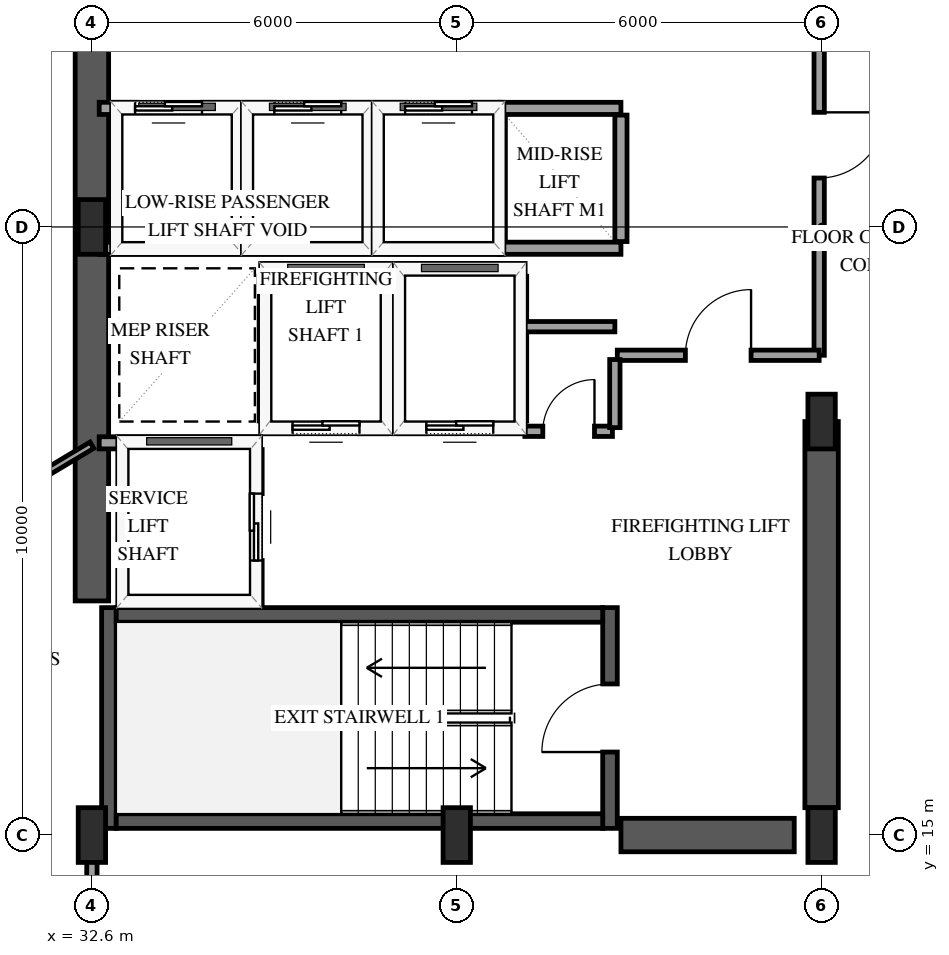
"""IFC4 building model, lengths in metres.
Left out: names, types, materials, properties, quantities, classifications, styles, units other than length and angle.
Written with IfcOpenShell. Run it as: python <this file> out.ifc"""

import sys

from ifc_helpers import new_model, si_unit, direction, frame, frame_2d, origin, origin_2d, place, context, subcontext, project, spatial, rectangle, extrude, element, fill, save


model = new_model("IFC4")
c1 = context("Model", 3, precision=1e-05, world=origin(), true_north=direction((0.0, 1.0)))
c2 = subcontext(c1, "Body", "Model", "MODEL_VIEW")
j1 = project(units=[si_unit("LENGTHUNIT", "METRE"), si_unit("PLANEANGLEUNIT", "RADIAN")], contexts=[c1])
p1 = place(None, origin())
s1 = spatial("IfcSite", under=j1, at=p1, CompositionType="ELEMENT")
p2 = place(p1, origin())
s2 = spatial("IfcBuilding", under=s1, at=p2, CompositionType="ELEMENT")
p3 = place(p2, frame((0.0, 0.0, 99.1)))
s3 = spatial("IfcBuildingStorey", under=s2, at=p3, CompositionType="ELEMENT", Elevation=99.1)
p4 = place(p3, frame((32.88, 15.11, 0.0), z_axis=(0.0, 0.0, 1.0), x_axis=(0.0, 1.0, 0.0)))
e1 = element("IfcWall", 1, at=p4, inside=s3, PredefinedType="SHEAR", context=c2, shape_type="SweptSolid", body=[
    extrude(rectangle(XDim=3.63, YDim=0.24, at=frame_2d((1.815, 0.0))), origin(), (0.0, 0.0, 1.0), 3.9),
])
p5 = place(p3, frame((41.12, 15.11, 0.0), z_axis=(0.0, 0.0, 1.0), x_axis=(0.0, 1.0, 0.0)))
e2 = element("IfcWall", 2, at=p5, inside=s3, PredefinedType="SHEAR", context=c2, shape_type="SweptSolid", body=[
    extrude(rectangle(XDim=3.63, YDim=0.24, at=frame_2d((1.815, 0.0))), origin(), (0.0, 0.0, 1.0), 3.9),
])
p6 = place(p5, frame((1.255, 0.0, 0.0)))
e3 = element("IfcOpeningElement", 3, at=p6, cuts=e2, PredefinedType="OPENING", context=c2, shape_type="SweptSolid", body=[
    extrude(rectangle(XDim=1.12, YDim=2.15, at=frame_2d((0.56, 1.075))), frame((0.0, 0.13, 0.0), z_axis=(0.0, -1.0, 0.0), x_axis=(1.0, 0.0, 0.0)), (0.0, 0.0, 1.0), 0.26),
])
for number, where, z_axis, x_axis in (
    (4, (33.0, 15.23, 0.0), (0.0, 0.0, 1.0), (1.0, 0.0, 0.0)),
    (5, (33.0, 18.62, 0.0), (0.0, 0.0, 1.0), (1.0, 0.0, 0.0)),
):
    element("IfcWall", number, at=place(p3, frame(where, z_axis=z_axis, x_axis=x_axis)), inside=s3, PredefinedType="SHEAR", context=c2, shape_type="SweptSolid", body=[
        extrude(rectangle(XDim=8.0, YDim=0.24, at=frame_2d((4.0, 0.0))), origin(), (0.0, 0.0, 1.0), 3.9),
    ])
p7 = place(p3, frame((32.6, 18.85, 0.0), z_axis=(0.0, 0.0, 1.0), x_axis=(0.0, 1.0, 0.0)))
e6 = element("IfcWall", 6, at=p7, inside=s3, PredefinedType="SHEAR", context=c2, shape_type="SweptSolid", body=[
    extrude(rectangle(XDim=12.3, YDim=0.55, at=frame_2d((6.15, 0.0))), origin(), (0.0, 0.0, 1.0), 3.9),
])
p8 = place(p3, frame((41.3, 15.0, 0.0), z_axis=(0.0, 0.0, 1.0), x_axis=(1.0, 0.0, 0.0)))
e7 = element("IfcWall", 7, at=p8, inside=s3, PredefinedType="SHEAR", context=c2, shape_type="SweptSolid", body=[
    extrude(rectangle(XDim=2.85, YDim=0.55, at=frame_2d((1.425, 0.0))), origin(), (0.0, 0.0, 1.0), 3.9),
])
p9 = place(p3, frame((44.6, 15.45, 0.0), z_axis=(0.0, 0.0, 1.0), x_axis=(0.0, 1.0, 0.0)))
e8 = element("IfcWall", 8, at=p9, inside=s3, PredefinedType="SHEAR", context=c2, shape_type="SweptSolid", body=[
    extrude(rectangle(XDim=6.35, YDim=0.55, at=frame_2d((3.175, 0.0))), origin(), (0.0, 0.0, 1.0), 3.9),
])
for number, where, z_axis, x_axis in (
    (9, (32.6, 15.0, 0.0), (0.0, 0.0, 1.0), (1.0, 0.0, 0.0)),
    (10, (32.6, 25.0, 0.0), (0.0, 0.0, 1.0), (1.0, 0.0, 0.0)),
    (11, (38.6, 15.0, 0.0), (0.0, 0.0, 1.0), (1.0, 0.0, 0.0)),
    (12, (44.6, 15.0, 0.0), (0.0, 0.0, 1.0), (1.0, 0.0, 0.0)),
    (13, (44.6, 21.8, 0.0), (0.0, 0.0, 1.0), (1.0, 0.0, 0.0)),
):
    element("IfcColumn", number, at=place(p3, frame(where, z_axis=z_axis, x_axis=x_axis)), inside=s3, PredefinedType="PILASTER", context=c2, shape_type="SweptSolid", body=[
        extrude(rectangle(XDim=0.45, YDim=0.9, at=origin_2d()), origin(), (0.0, 0.0, 1.0), 3.9),
    ])
p10 = place(p3, frame((35.45, 21.7, 0.0), z_axis=(0.0, 0.0, 1.0), x_axis=(1.0, 0.0, 0.0)))
e14 = element("IfcWall", 14, at=p10, inside=s3, PredefinedType="SOLIDWALL", context=c2, shape_type="SweptSolid", body=[
    extrude(rectangle(XDim=2.0, YDim=0.2, at=frame_2d((1.0, 0.0))), origin(), (0.0, 0.0, 1.0), 3.6),
])
p11 = place(p10, frame((0.45, 0.0, 0.0)))
e15 = element("IfcOpeningElement", 15, at=p11, cuts=e14, PredefinedType="OPENING", context=c2, shape_type="SweptSolid", body=[
    extrude(rectangle(XDim=1.1, YDim=2.15, at=frame_2d((0.55, 1.075))), frame((0.0, 0.11, 0.0), z_axis=(0.0, -1.0, 0.0), x_axis=(1.0, 0.0, 0.0)), (0.0, 0.0, 1.0), 0.22),
])
p12 = place(p3, frame((35.45, 24.3, 0.0), z_axis=(0.0, 0.0, 1.0), x_axis=(1.0, 0.0, 0.0)))
e16 = element("IfcWall", 16, at=p12, inside=s3, PredefinedType="SOLIDWALL", context=c2, shape_type="SweptSolid", body=[
    extrude(rectangle(XDim=2.0, YDim=0.2, at=frame_2d((1.0, 0.0))), origin(), (0.0, 0.0, 1.0), 3.6),
])
for number, where, z_axis, x_axis in (
    (17, (35.45, 21.81, 0.0), (0.0, 0.0, 1.0), (0.0, 1.0, 0.0)),
    (18, (37.45, 21.81, 0.0), (0.0, 0.0, 1.0), (0.0, 1.0, 0.0)),
):
    element("IfcWall", number, at=place(p3, frame(where, z_axis=z_axis, x_axis=x_axis)), inside=s3, PredefinedType="SOLIDWALL", context=c2, shape_type="SweptSolid", body=[
        extrude(rectangle(XDim=2.38, YDim=0.2, at=frame_2d((1.19, 0.0))), origin(), (0.0, 0.0, 1.0), 3.6),
    ])
p13 = place(p3, frame((37.65, 21.7, 0.0), z_axis=(0.0, 0.0, 1.0), x_axis=(1.0, 0.0, 0.0)))
e19 = element("IfcWall", 19, at=p13, inside=s3, PredefinedType="SOLIDWALL", context=c2, shape_type="SweptSolid", body=[
    extrude(rectangle(XDim=2.0, YDim=0.2, at=frame_2d((1.0, 0.0))), origin(), (0.0, 0.0, 1.0), 3.6),
])
p14 = place(p13, frame((0.45, 0.0, 0.0)))
e20 = element("IfcOpeningElement", 20, at=p14, cuts=e19, PredefinedType="OPENING", context=c2, shape_type="SweptSolid", body=[
    extrude(rectangle(XDim=1.1, YDim=2.15, at=frame_2d((0.55, 1.075))), frame((0.0, 0.11, 0.0), z_axis=(0.0, -1.0, 0.0), x_axis=(1.0, 0.0, 0.0)), (0.0, 0.0, 1.0), 0.22),
])
p15 = place(p3, frame((37.65, 24.3, 0.0), z_axis=(0.0, 0.0, 1.0), x_axis=(1.0, 0.0, 0.0)))
e21 = element("IfcWall", 21, at=p15, inside=s3, PredefinedType="SOLIDWALL", context=c2, shape_type="SweptSolid", body=[
    extrude(rectangle(XDim=2.0, YDim=0.2, at=frame_2d((1.0, 0.0))), origin(), (0.0, 0.0, 1.0), 3.6),
])
p16 = place(p3, frame((39.65, 21.81, 0.0), z_axis=(0.0, 0.0, 1.0), x_axis=(0.0, 1.0, 0.0)))
e22 = element("IfcWall", 22, at=p16, inside=s3, PredefinedType="SOLIDWALL", context=c2, shape_type="SweptSolid", body=[
    extrude(rectangle(XDim=2.38, YDim=0.2, at=frame_2d((1.19, 0.0))), origin(), (0.0, 0.0, 1.0), 3.6),
])
p17 = place(p3, frame((32.72, 21.45, 0.0), z_axis=(0.0, 0.0, 1.0), x_axis=(1.0, 0.0, 0.0)))
e23 = element("IfcWall", 23, at=p17, inside=s3, PredefinedType="SOLIDWALL", context=c2, shape_type="SweptSolid", body=[
    extrude(rectangle(XDim=2.58, YDim=0.2, at=frame_2d((1.29, 0.0))), origin(), (0.0, 0.0, 1.0), 3.6),
])
p18 = place(p3, frame((35.3, 18.79, 0.0), z_axis=(0.0, 0.0, 1.0), x_axis=(0.0, 1.0, 0.0)))
e24 = element("IfcWall", 24, at=p18, inside=s3, PredefinedType="SOLIDWALL", context=c2, shape_type="SweptSolid", body=[
    extrude(rectangle(XDim=2.55, YDim=0.2, at=frame_2d((1.275, 0.0))), origin(), (0.0, 0.0, 1.0), 3.6),
])
p19 = place(p18, frame((0.725, 0.0, 0.0)))
e25 = element("IfcOpeningElement", 25, at=p19, cuts=e24, PredefinedType="OPENING", context=c2, shape_type="SweptSolid", body=[
    extrude(rectangle(XDim=1.1, YDim=2.15, at=frame_2d((0.55, 1.075))), frame((0.0, 0.11, 0.0), z_axis=(0.0, -1.0, 0.0), x_axis=(1.0, 0.0, 0.0)), (0.0, 0.0, 1.0), 0.22),
])
p20 = place(p3, frame((32.72, 24.65, 0.0), z_axis=(0.0, 0.0, 1.0), x_axis=(1.0, 0.0, 0.0)))
e26 = element("IfcWall", 26, at=p20, inside=s3, PredefinedType="SOLIDWALL", context=c2, shape_type="SweptSolid", body=[
    extrude(rectangle(XDim=2.28, YDim=0.2, at=frame_2d((1.14, 0.0))), origin(), (0.0, 0.0, 1.0), 3.6),
])
p21 = place(p3, frame((32.72, 26.95, 0.0), z_axis=(0.0, 0.0, 1.0), x_axis=(1.0, 0.0, 0.0)))
e27 = element("IfcWall", 27, at=p21, inside=s3, PredefinedType="SOLIDWALL", context=c2, shape_type="SweptSolid", body=[
    extrude(rectangle(XDim=2.28, YDim=0.2, at=frame_2d((1.14, 0.0))), origin(), (0.0, 0.0, 1.0), 3.6),
])
p22 = place(p21, frame((0.59, 0.0, 0.0)))
e28 = element("IfcOpeningElement", 28, at=p22, cuts=e27, PredefinedType="OPENING", context=c2, shape_type="SweptSolid", body=[
    extrude(rectangle(XDim=1.1, YDim=2.15, at=frame_2d((0.55, 1.075))), frame((0.0, 0.11, 0.0), z_axis=(0.0, -1.0, 0.0), x_axis=(1.0, 0.0, 0.0)), (0.0, 0.0, 1.0), 0.22),
])
p23 = place(p3, frame((35.0, 24.76, 0.0), z_axis=(0.0, 0.0, 1.0), x_axis=(0.0, 1.0, 0.0)))
e29 = element("IfcWall", 29, at=p23, inside=s3, PredefinedType="SOLIDWALL", context=c2, shape_type="SweptSolid", body=[
    extrude(rectangle(XDim=2.08, YDim=0.2, at=frame_2d((1.04, 0.0))), origin(), (0.0, 0.0, 1.0), 3.6),
])
p24 = place(p3, frame((35.15, 24.65, 0.0), z_axis=(0.0, 0.0, 1.0), x_axis=(1.0, 0.0, 0.0)))
e30 = element("IfcWall", 30, at=p24, inside=s3, PredefinedType="SOLIDWALL", context=c2, shape_type="SweptSolid", body=[
    extrude(rectangle(XDim=2.0, YDim=0.2, at=frame_2d((1.0, 0.0))), origin(), (0.0, 0.0, 1.0), 3.6),
])
p25 = place(p3, frame((35.15, 26.95, 0.0), z_axis=(0.0, 0.0, 1.0), x_axis=(1.0, 0.0, 0.0)))
e31 = element("IfcWall", 31, at=p25, inside=s3, PredefinedType="SOLIDWALL", context=c2, shape_type="SweptSolid", body=[
    extrude(rectangle(XDim=2.0, YDim=0.2, at=frame_2d((1.0, 0.0))), origin(), (0.0, 0.0, 1.0), 3.6),
])
p26 = place(p25, frame((0.45, 0.0, 0.0)))
e32 = element("IfcOpeningElement", 32, at=p26, cuts=e31, PredefinedType="OPENING", context=c2, shape_type="SweptSolid", body=[
    extrude(rectangle(XDim=1.1, YDim=2.15, at=frame_2d((0.55, 1.075))), frame((0.0, 0.11, 0.0), z_axis=(0.0, -1.0, 0.0), x_axis=(1.0, 0.0, 0.0)), (0.0, 0.0, 1.0), 0.22),
])
p27 = place(p3, frame((37.15, 24.76, 0.0), z_axis=(0.0, 0.0, 1.0), x_axis=(0.0, 1.0, 0.0)))
e33 = element("IfcWall", 33, at=p27, inside=s3, PredefinedType="SOLIDWALL", context=c2, shape_type="SweptSolid", body=[
    extrude(rectangle(XDim=2.08, YDim=0.2, at=frame_2d((1.04, 0.0))), origin(), (0.0, 0.0, 1.0), 3.6),
])
p28 = place(p3, frame((37.3, 24.65, 0.0), z_axis=(0.0, 0.0, 1.0), x_axis=(1.0, 0.0, 0.0)))
e34 = element("IfcWall", 34, at=p28, inside=s3, PredefinedType="SOLIDWALL", context=c2, shape_type="SweptSolid", body=[
    extrude(rectangle(XDim=2.0, YDim=0.2, at=frame_2d((1.0, 0.0))), origin(), (0.0, 0.0, 1.0), 3.6),
])
p29 = place(p3, frame((37.3, 26.95, 0.0), z_axis=(0.0, 0.0, 1.0), x_axis=(1.0, 0.0, 0.0)))
e35 = element("IfcWall", 35, at=p29, inside=s3, PredefinedType="SOLIDWALL", context=c2, shape_type="SweptSolid", body=[
    extrude(rectangle(XDim=2.0, YDim=0.2, at=frame_2d((1.0, 0.0))), origin(), (0.0, 0.0, 1.0), 3.6),
])
p30 = place(p29, frame((0.45, 0.0, 0.0)))
e36 = element("IfcOpeningElement", 36, at=p30, cuts=e35, PredefinedType="OPENING", context=c2, shape_type="SweptSolid", body=[
    extrude(rectangle(XDim=1.1, YDim=2.15, at=frame_2d((0.55, 1.075))), frame((0.0, 0.11, 0.0), z_axis=(0.0, -1.0, 0.0), x_axis=(1.0, 0.0, 0.0)), (0.0, 0.0, 1.0), 0.22),
])
p31 = place(p3, frame((39.3, 24.76, 0.0), z_axis=(0.0, 0.0, 1.0), x_axis=(0.0, 1.0, 0.0)))
e37 = element("IfcWall", 37, at=p31, inside=s3, PredefinedType="SOLIDWALL", context=c2, shape_type="SweptSolid", body=[
    extrude(rectangle(XDim=2.08, YDim=0.2, at=frame_2d((1.04, 0.0))), origin(), (0.0, 0.0, 1.0), 3.6),
])
for number, where, z_axis, x_axis in (
    (38, (39.3, 24.65, 0.0), (0.0, 0.0, 1.0), (1.0, 0.0, 0.0)),
    (39, (39.3, 26.95, 0.0), (0.0, 0.0, 1.0), (1.0, 0.0, 0.0)),
):
    element("IfcWall", number, at=place(p3, frame(where, z_axis=z_axis, x_axis=x_axis)), inside=s3, PredefinedType="SOLIDWALL", context=c2, shape_type="SweptSolid", body=[
        extrude(rectangle(XDim=2.0, YDim=0.2, at=frame_2d((1.0, 0.0))), origin(), (0.0, 0.0, 1.0), 3.6),
    ])
p32 = place(p3, frame((41.3, 24.76, 0.0), z_axis=(0.0, 0.0, 1.0), x_axis=(0.0, 1.0, 0.0)))
e40 = element("IfcWall", 40, at=p32, inside=s3, PredefinedType="SOLIDWALL", context=c2, shape_type="SweptSolid", body=[
    extrude(rectangle(XDim=2.08, YDim=0.2, at=frame_2d((1.04, 0.0))), origin(), (0.0, 0.0, 1.0), 3.6),
])
p33 = place(p3, frame((44.56, 29.8, 0.0), z_axis=(0.0, 0.0, 1.0), x_axis=(0.0, -1.0, 0.0)))
e41 = element("IfcWall", 41, at=p33, inside=s3, PredefinedType="PARTITIONING", context=c2, shape_type="SweptSolid", body=[
    extrude(rectangle(XDim=6.91, YDim=0.17, at=frame_2d((3.455, 0.0))), origin(), (0.0, 0.0, 1.0), 2.64),
])
p34 = place(p33, frame((2.915, 0.0, 0.0)))
e42 = element("IfcOpeningElement", 42, at=p34, cuts=e41, PredefinedType="OPENING", context=c2, shape_type="SweptSolid", body=[
    extrude(rectangle(XDim=1.08, YDim=2.15, at=frame_2d((0.54, 1.075))), frame((0.0, 0.095, 0.0), z_axis=(0.0, -1.0, 0.0), x_axis=(1.0, 0.0, 0.0)), (0.0, 0.0, 1.0), 0.19),
])
p35 = place(p3, frame((32.6, 21.411, 0.0), z_axis=(0.0, 0.0, 1.0), x_axis=(-0.858222476584, -0.513277878625, 0.0)))
e43 = element("IfcWall", 43, at=p35, inside=s3, PredefinedType="PARTITIONING", context=c2, shape_type="SweptSolid", body=[
    extrude(rectangle(XDim=6.164, YDim=0.12, at=frame_2d((3.082, 0.0))), origin(), (0.0, 0.0, 1.0), 3.6),
])
p36 = place(p3, frame((41.24, 22.89, 0.0), z_axis=(0.0, 0.0, 1.0), x_axis=(1.0, 0.0, 0.0)))
e44 = element("IfcWall", 44, at=p36, inside=s3, PredefinedType="PARTITIONING", context=c2, shape_type="SweptSolid", body=[
    extrude(rectangle(XDim=3.32, YDim=0.17, at=frame_2d((1.66, 0.0))), origin(), (0.0, 0.0, 1.0), 3.6),
])
p37 = place(p36, frame((1.12, 0.0, 0.0)))
e45 = element("IfcOpeningElement", 45, at=p37, cuts=e44, PredefinedType="OPENING", context=c2, shape_type="SweptSolid", body=[
    extrude(rectangle(XDim=1.08, YDim=2.15, at=frame_2d((0.54, 1.075))), frame((0.0, 0.095, 0.0), z_axis=(0.0, -1.0, 0.0), x_axis=(1.0, 0.0, 0.0)), (0.0, 0.0, 1.0), 0.19),
])
p38 = place(p3, frame((32.6, 13.02, 0.0), z_axis=(0.0, 0.0, 1.0), x_axis=(0.0, 1.0, 0.0)))
e46 = element("IfcWall", 46, at=p38, inside=s3, PredefinedType="PARTITIONING", context=c2, shape_type="SweptSolid", body=[
    extrude(rectangle(XDim=1.91, YDim=0.17, at=frame_2d((0.955, 0.0))), origin(), (0.0, 0.0, 1.0), 3.6),
])
p39 = place(p3, frame((39.72, 21.64, 0.0), z_axis=(0.0, 0.0, 1.0), x_axis=(1.0, 0.0, 0.0)))
e47 = element("IfcWall", 47, at=p39, inside=s3, PredefinedType="PARTITIONING", context=c2, shape_type="SweptSolid", body=[
    extrude(rectangle(XDim=1.44, YDim=0.17, at=frame_2d((0.72, 0.0))), origin(), (0.0, 0.0, 1.0), 3.6),
])
p40 = place(p39, frame((0.295, 0.0, 0.0)))
e48 = element("IfcOpeningElement", 48, at=p40, cuts=e47, PredefinedType="OPENING", context=c2, shape_type="SweptSolid", body=[
    extrude(rectangle(XDim=0.85, YDim=2.1, at=frame_2d((0.425, 1.05))), frame((0.0, 0.095, 0.0), z_axis=(0.0, -1.0, 0.0), x_axis=(1.0, 0.0, 0.0)), (0.0, 0.0, 1.0), 0.19),
])
p41 = place(p3, frame((41.2, 21.7, 0.0), z_axis=(0.0, 0.0, 1.0), x_axis=(0.0, 1.0, 0.0)))
e49 = element("IfcWall", 49, at=p41, inside=s3, PredefinedType="PARTITIONING", context=c2, shape_type="SweptSolid", body=[
    extrude(rectangle(XDim=1.12, YDim=0.17, at=frame_2d((0.56, 0.0))), origin(), (0.0, 0.0, 1.0), 3.6),
])
p42 = place(p3, frame((41.2, 23.36, 0.0), z_axis=(0.0, 0.0, 1.0), x_axis=(-1.0, 0.0, 0.0)))
e50 = element("IfcWall", 50, at=p42, inside=s3, PredefinedType="PARTITIONING", context=c2, shape_type="SweptSolid", body=[
    extrude(rectangle(XDim=1.48, YDim=0.17, at=frame_2d((0.74, 0.0))), origin(), (0.0, 0.0, 1.0), 3.6),
])
p43 = place(p11, origin())
e51 = element("IfcDoor", 51, at=p43, inside=s3, OperationType="SLIDING_TO_LEFT", PredefinedType="DOOR", context=c2, shape_type="SweptSolid", body=[
    extrude(rectangle(XDim=1.1, YDim=2.15, at=frame_2d((0.55, 1.075))), frame((0.0, 0.025, 0.0), z_axis=(0.0, -1.0, 0.0), x_axis=(1.0, 0.0, 0.0)), (0.0, 0.0, 1.0), 0.05),
])
fill(e15, e51)
p44 = place(p14, origin())
e52 = element("IfcDoor", 52, at=p44, inside=s3, OperationType="SLIDING_TO_LEFT", PredefinedType="DOOR", context=c2, shape_type="SweptSolid", body=[
    extrude(rectangle(XDim=1.1, YDim=2.15, at=frame_2d((0.55, 1.075))), frame((0.0, 0.025, 0.0), z_axis=(0.0, -1.0, 0.0), x_axis=(1.0, 0.0, 0.0)), (0.0, 0.0, 1.0), 0.05),
])
fill(e20, e52)
p45 = place(p19, origin())
e53 = element("IfcDoor", 53, at=p45, inside=s3, OperationType="SLIDING_TO_LEFT", PredefinedType="DOOR", context=c2, shape_type="SweptSolid", body=[
    extrude(rectangle(XDim=1.1, YDim=2.15, at=frame_2d((0.55, 1.075))), frame((0.0, 0.025, 0.0), z_axis=(0.0, -1.0, 0.0), x_axis=(1.0, 0.0, 0.0)), (0.0, 0.0, 1.0), 0.05),
])
fill(e25, e53)
p46 = place(p22, origin())
e54 = element("IfcDoor", 54, at=p46, inside=s3, OperationType="SLIDING_TO_LEFT", PredefinedType="DOOR", context=c2, shape_type="SweptSolid", body=[
    extrude(rectangle(XDim=1.1, YDim=2.15, at=frame_2d((0.55, 1.075))), frame((0.0, 0.025, 0.0), z_axis=(0.0, -1.0, 0.0), x_axis=(1.0, 0.0, 0.0)), (0.0, 0.0, 1.0), 0.05),
])
fill(e28, e54)
p47 = place(p26, origin())
e55 = element("IfcDoor", 55, at=p47, inside=s3, OperationType="SLIDING_TO_LEFT", PredefinedType="DOOR", context=c2, shape_type="SweptSolid", body=[
    extrude(rectangle(XDim=1.1, YDim=2.15, at=frame_2d((0.55, 1.075))), frame((0.0, 0.025, 0.0), z_axis=(0.0, -1.0, 0.0), x_axis=(1.0, 0.0, 0.0)), (0.0, 0.0, 1.0), 0.05),
])
fill(e32, e55)
p48 = place(p30, origin())
e56 = element("IfcDoor", 56, at=p48, inside=s3, OperationType="SLIDING_TO_LEFT", PredefinedType="DOOR", context=c2, shape_type="SweptSolid", body=[
    extrude(rectangle(XDim=1.1, YDim=2.15, at=frame_2d((0.55, 1.075))), frame((0.0, 0.025, 0.0), z_axis=(0.0, -1.0, 0.0), x_axis=(1.0, 0.0, 0.0)), (0.0, 0.0, 1.0), 0.05),
])
fill(e36, e56)
p49 = place(p6, origin())
e57 = element("IfcDoor", 57, at=p49, inside=s3, OperationType="SINGLE_SWING_LEFT", PredefinedType="DOOR", context=c2, shape_type="SweptSolid", body=[
    extrude(rectangle(XDim=1.12, YDim=2.15, at=frame_2d((0.56, 1.075))), frame((0.0, 0.025, 0.0), z_axis=(0.0, -1.0, 0.0), x_axis=(1.0, 0.0, 0.0)), (0.0, 0.0, 1.0), 0.05),
])
fill(e3, e57)
p50 = place(p34, origin())
e58 = element("IfcDoor", 58, at=p50, inside=s3, OperationType="SINGLE_SWING_LEFT", PredefinedType="DOOR", context=c2, shape_type="SweptSolid", body=[
    extrude(rectangle(XDim=1.08, YDim=2.15, at=frame_2d((0.54, 1.075))), frame((0.0, 0.025, 0.0), z_axis=(0.0, -1.0, 0.0), x_axis=(1.0, 0.0, 0.0)), (0.0, 0.0, 1.0), 0.05),
])
fill(e42, e58)
p51 = place(p37, origin())
e59 = element("IfcDoor", 59, at=p51, inside=s3, OperationType="SINGLE_SWING_RIGHT", PredefinedType="DOOR", context=c2, shape_type="SweptSolid", body=[
    extrude(rectangle(XDim=1.08, YDim=2.15, at=frame_2d((0.54, 1.075))), frame((0.0, 0.025, 0.0), z_axis=(0.0, -1.0, 0.0), x_axis=(1.0, 0.0, 0.0)), (0.0, 0.0, 1.0), 0.05),
])
fill(e45, e59)
p52 = place(p40, origin())
e60 = element("IfcDoor", 60, at=p52, inside=s3, OperationType="SINGLE_SWING_RIGHT", PredefinedType="DOOR", context=c2, shape_type="SweptSolid", body=[
    extrude(rectangle(XDim=0.85, YDim=2.1, at=frame_2d((0.425, 1.05))), frame((0.0, 0.025, 0.0), z_axis=(0.0, -1.0, 0.0), x_axis=(1.0, 0.0, 0.0)), (0.0, 0.0, 1.0), 0.05),
])
fill(e48, e60)
save(model, sys.argv[1])
